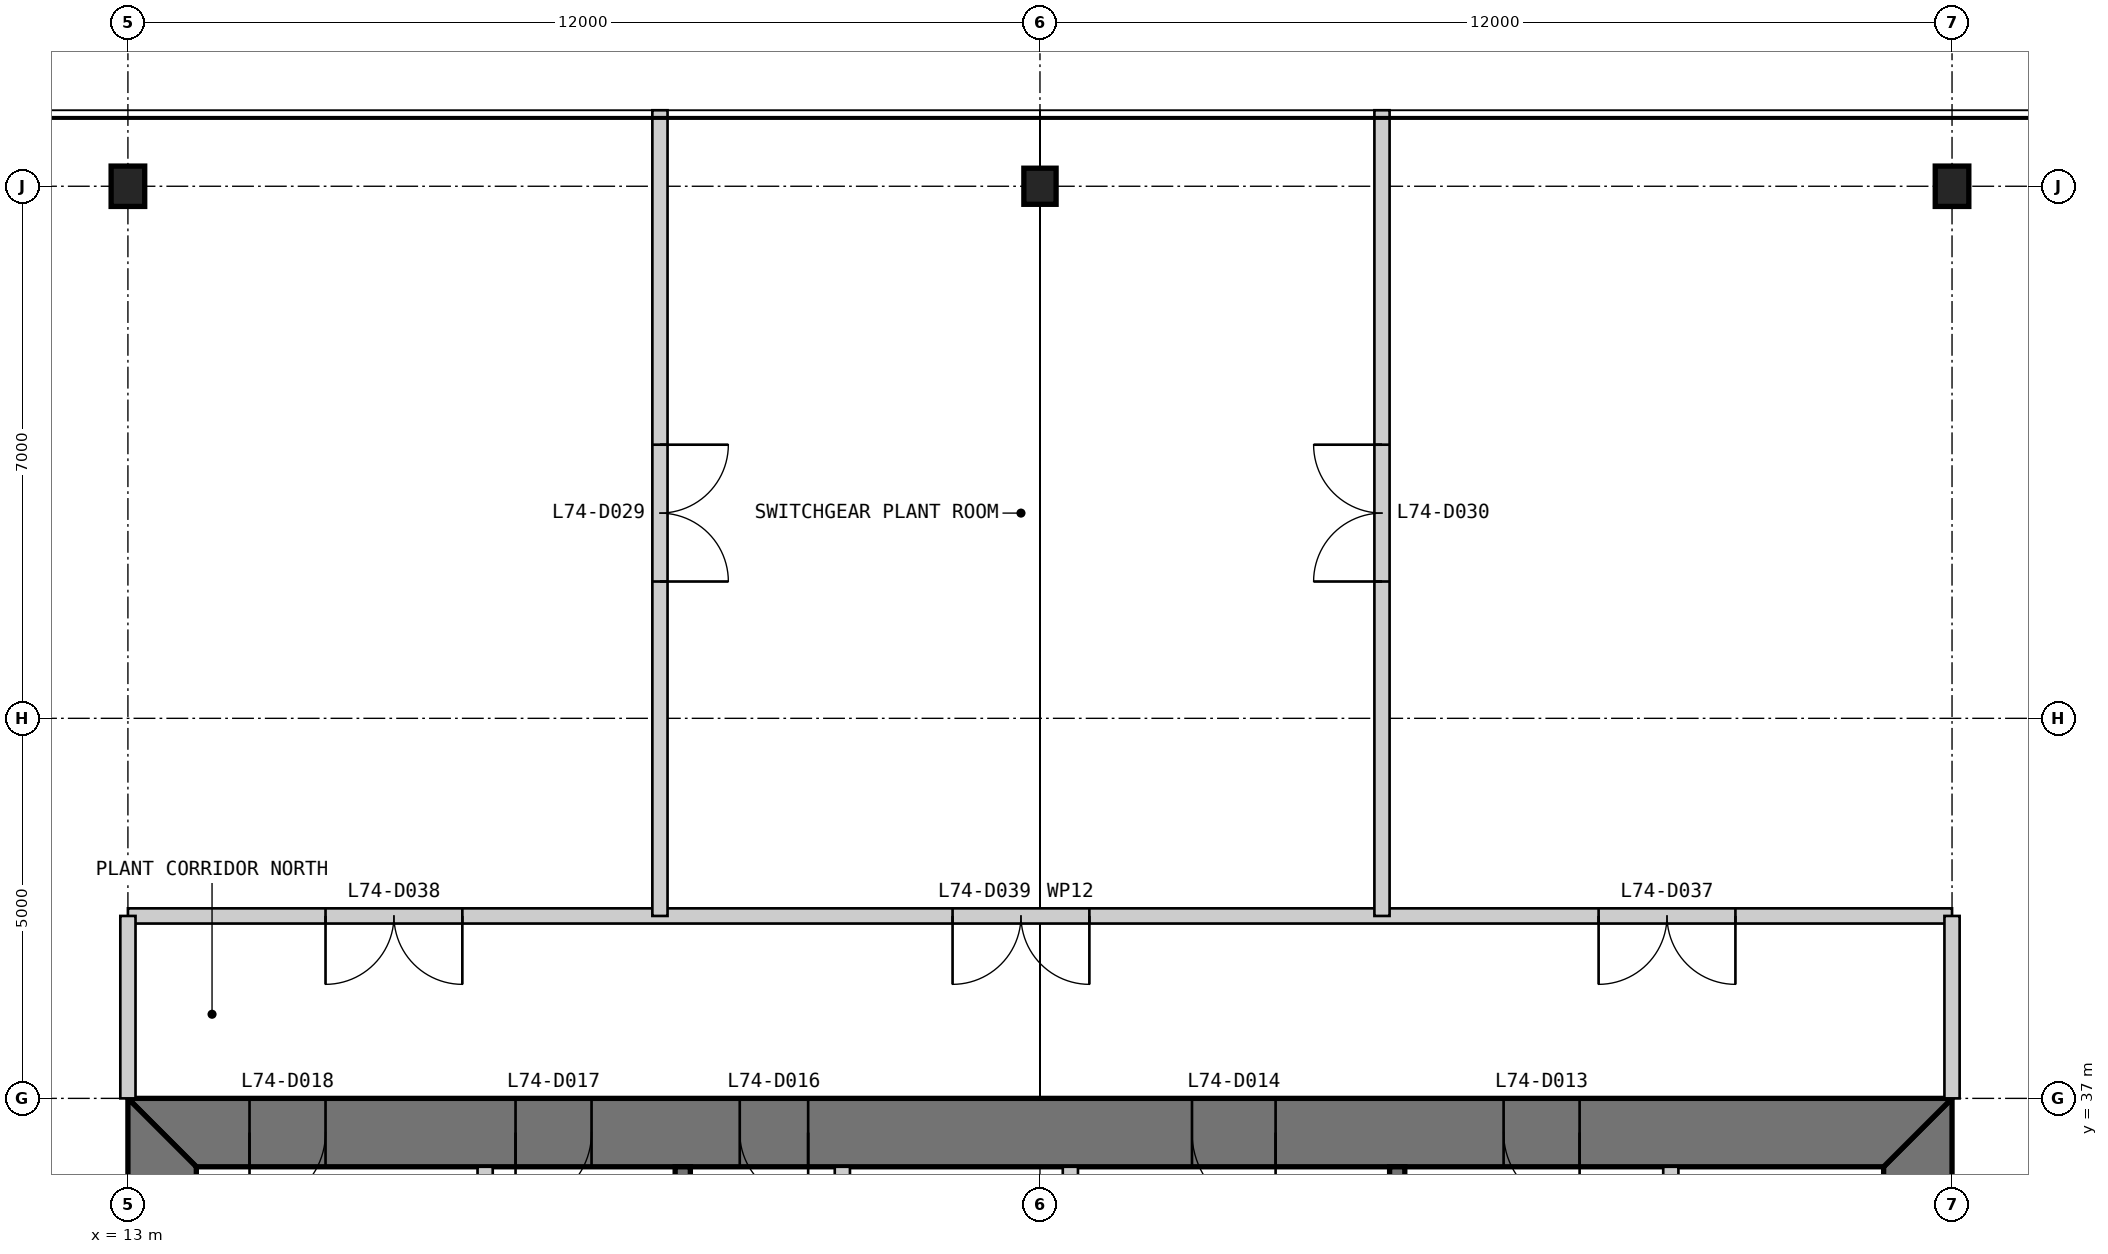
"""IFC4 building model, lengths in metres.
Left out: names, types, materials, properties, quantities, classifications, styles, units other than length and angle.
Written with IfcOpenShell. Run it as: python <this file> out.ifc"""

import sys

from ifc_helpers import new_model, si_unit, direction, frame, frame_2d, origin, origin_2d, place, context, subcontext, project, spatial, polyline, rectangle, i_section, outline, extrude, element, fill, save


model = new_model("IFC4")
c1 = context("Model", 3, precision=1e-05, world=origin(), true_north=direction((0.0, 1.0)))
c2 = subcontext(c1, "Body", "Model", "MODEL_VIEW")
j1 = project(units=[si_unit("LENGTHUNIT", "METRE"), si_unit("PLANEANGLEUNIT", "RADIAN")], contexts=[c1])
p1 = place(None, origin())
s1 = spatial("IfcSite", under=j1, at=p1, CompositionType="ELEMENT")
p2 = place(p1, origin())
s2 = spatial("IfcBuilding", under=s1, at=p2, CompositionType="ELEMENT")
p3 = place(p2, frame((0.0, 0.0, 307.8)))
s3 = spatial("IfcBuildingStorey", under=s2, at=p3, CompositionType="ELEMENT", Elevation=307.8)
p4 = place(p3, frame((37.0, 49.0, 0.0), z_axis=(0.0, 0.0, 1.0), x_axis=(1.0, 0.0, 0.0)))
e1 = element("IfcColumn", 1, at=p4, inside=s3, PredefinedType="COLUMN", context=c2, shape_type="SweptSolid", body=[
    extrude(i_section(OverallWidth=0.442, OverallDepth=0.531, WebThickness=0.066, FlangeThickness=0.106, at=origin_2d()), origin(), (0.0, 0.0, 1.0), 5.75),
])
p5 = place(p3, frame((25.0, 49.0, 0.0), z_axis=(0.0, 0.0, 1.0), x_axis=(1.0, 0.0, 0.0)))
e2 = element("IfcColumn", 2, at=p5, inside=s3, PredefinedType="COLUMN", context=c2, shape_type="SweptSolid", body=[
    extrude(i_section(OverallWidth=0.424, OverallDepth=0.475, WebThickness=0.048, FlangeThickness=0.077, at=origin_2d()), origin(), (0.0, 0.0, 1.0), 5.75),
])
p6 = place(p3, frame((13.0, 49.0, 0.0), z_axis=(0.0, 0.0, 1.0), x_axis=(1.0, 0.0, 0.0)))
e3 = element("IfcColumn", 3, at=p6, inside=s3, PredefinedType="COLUMN", context=c2, shape_type="SweptSolid", body=[
    extrude(i_section(OverallWidth=0.442, OverallDepth=0.531, WebThickness=0.066, FlangeThickness=0.106, at=origin_2d()), origin(), (0.0, 0.0, 1.0), 5.75),
])
p7 = place(p3, frame((36.55, 13.9, 0.0), z_axis=(0.0, 0.0, 1.0), x_axis=(0.0, 1.0, 0.0)))
e4 = element("IfcWall", 4, at=p7, inside=s3, PredefinedType="SHEAR", context=c2, shape_type="SweptSolid", body=[
    extrude(outline(polyline([(-0.9, -0.45), (23.1, -0.45), (22.2, 0.45), (0.0, 0.45), (-0.9, -0.45)])), origin(), (0.0, 0.0, 1.0), 5.75),
])
p8 = place(p7, frame((20.2, 0.0, 0.0)))
e5 = element("IfcOpeningElement", 5, at=p8, cuts=e4, PredefinedType="OPENING", context=c2, shape_type="SweptSolid", body=[
    extrude(rectangle(XDim=1.0, YDim=2.2, at=frame_2d((0.5, 1.1))), frame((0.0, 0.46, 0.0), z_axis=(0.0, -1.0, 0.0), x_axis=(1.0, 0.0, 0.0)), (0.0, 0.0, 1.0), 0.92),
])
p9 = place(p7, frame((17.25, 0.0, 0.0)))
e6 = element("IfcOpeningElement", 6, at=p9, cuts=e4, PredefinedType="OPENING", context=c2, shape_type="SweptSolid", body=[
    extrude(rectangle(XDim=0.9, YDim=2.2, at=frame_2d((0.45, 1.1))), frame((0.0, 0.46, 0.0), z_axis=(0.0, -1.0, 0.0), x_axis=(1.0, 0.0, 0.0)), (0.0, 0.0, 1.0), 0.92),
])
p10 = place(p3, frame((37.0, 36.55, 0.0), z_axis=(0.0, 0.0, 1.0), x_axis=(-1.0, 0.0, 0.0)))
e7 = element("IfcWall", 7, at=p10, inside=s3, PredefinedType="SHEAR", context=c2, shape_type="SweptSolid", body=[
    extrude(outline(polyline([(0.0, -0.45), (24.0, -0.45), (23.1, 0.45), (0.9, 0.45), (0.0, -0.45)])), origin(), (0.0, 0.0, 1.0), 5.75),
])
p11 = place(p10, frame((4.9, 0.0, 0.0)))
e8 = element("IfcOpeningElement", 8, at=p11, cuts=e7, PredefinedType="OPENING", context=c2, shape_type="SweptSolid", body=[
    extrude(rectangle(XDim=1.0, YDim=2.2, at=frame_2d((0.5, 1.1))), frame((0.0, 0.46, 0.0), z_axis=(0.0, -1.0, 0.0), x_axis=(1.0, 0.0, 0.0)), (0.0, 0.0, 1.0), 0.92),
])
p12 = place(p10, frame((8.9, 0.0, 0.0)))
e9 = element("IfcOpeningElement", 9, at=p12, cuts=e7, PredefinedType="OPENING", context=c2, shape_type="SweptSolid", body=[
    extrude(rectangle(XDim=1.1, YDim=2.2, at=frame_2d((0.55, 1.1))), frame((0.0, 0.46, 0.0), z_axis=(0.0, -1.0, 0.0), x_axis=(1.0, 0.0, 0.0)), (0.0, 0.0, 1.0), 0.92),
])
p13 = place(p10, frame((15.05, 0.0, 0.0)))
e10 = element("IfcOpeningElement", 10, at=p13, cuts=e7, PredefinedType="OPENING", context=c2, shape_type="SweptSolid", body=[
    extrude(rectangle(XDim=0.9, YDim=2.2, at=frame_2d((0.45, 1.1))), frame((0.0, 0.46, 0.0), z_axis=(0.0, -1.0, 0.0), x_axis=(1.0, 0.0, 0.0)), (0.0, 0.0, 1.0), 0.92),
])
p14 = place(p10, frame((17.9, 0.0, 0.0)))
e11 = element("IfcOpeningElement", 11, at=p14, cuts=e7, PredefinedType="OPENING", context=c2, shape_type="SweptSolid", body=[
    extrude(rectangle(XDim=1.0, YDim=2.2, at=frame_2d((0.5, 1.1))), frame((0.0, 0.46, 0.0), z_axis=(0.0, -1.0, 0.0), x_axis=(1.0, 0.0, 0.0)), (0.0, 0.0, 1.0), 0.92),
])
p15 = place(p10, frame((21.4, 0.0, 0.0)))
e12 = element("IfcOpeningElement", 12, at=p15, cuts=e7, PredefinedType="OPENING", context=c2, shape_type="SweptSolid", body=[
    extrude(rectangle(XDim=1.0, YDim=2.2, at=frame_2d((0.5, 1.1))), frame((0.0, 0.46, 0.0), z_axis=(0.0, -1.0, 0.0), x_axis=(1.0, 0.0, 0.0)), (0.0, 0.0, 1.0), 0.92),
])
p16 = place(p3, frame((13.45, 36.1, 0.0), z_axis=(0.0, 0.0, 1.0), x_axis=(0.0, -1.0, 0.0)))
e13 = element("IfcWall", 13, at=p16, inside=s3, PredefinedType="SHEAR", context=c2, shape_type="SweptSolid", body=[
    extrude(outline(polyline([(-0.9, -0.45), (23.1, -0.45), (22.2, 0.45), (0.0, 0.45), (-0.9, -0.45)])), origin(), (0.0, 0.0, 1.0), 5.75),
])
p17 = place(p16, frame((20.2, 0.0, 0.0)))
e14 = element("IfcOpeningElement", 14, at=p17, cuts=e13, PredefinedType="OPENING", context=c2, shape_type="SweptSolid", body=[
    extrude(rectangle(XDim=1.0, YDim=2.2, at=frame_2d((0.5, 1.1))), frame((0.0, 0.46, 0.0), z_axis=(0.0, -1.0, 0.0), x_axis=(1.0, 0.0, 0.0)), (0.0, 0.0, 1.0), 0.92),
])
p18 = place(p16, frame((17.25, 0.0, 0.0)))
e15 = element("IfcOpeningElement", 15, at=p18, cuts=e13, PredefinedType="OPENING", context=c2, shape_type="SweptSolid", body=[
    extrude(rectangle(XDim=0.9, YDim=2.2, at=frame_2d((0.45, 1.1))), frame((0.0, 0.46, 0.0), z_axis=(0.0, -1.0, 0.0), x_axis=(1.0, 0.0, 0.0)), (0.0, 0.0, 1.0), 0.92),
])
p19 = place(p3, frame((33.3, 36.1, 0.0), z_axis=(0.0, 0.0, 1.0), x_axis=(0.0, -1.0, 0.0)))
e16 = element("IfcWall", 16, at=p19, inside=s3, PredefinedType="PARTITIONING", context=c2, shape_type="SweptSolid", body=[
    extrude(rectangle(XDim=16.1, YDim=0.2, at=frame_2d((8.05, 0.0))), origin(), (0.0, 0.0, 1.0), 5.75),
])
p20 = place(p19, frame((9.65, 0.0, 0.0)))
e17 = element("IfcOpeningElement", 17, at=p20, cuts=e16, PredefinedType="OPENING", context=c2, shape_type="SweptSolid", body=[
    extrude(rectangle(XDim=0.9, YDim=2.2, at=frame_2d((0.45, 1.1))), frame((0.0, 0.11, 0.0), z_axis=(0.0, -1.0, 0.0), x_axis=(1.0, 0.0, 0.0)), (0.0, 0.0, 1.0), 0.22),
])
p21 = place(p19, frame((13.65, 0.0, 0.0)))
e18 = element("IfcOpeningElement", 18, at=p21, cuts=e16, PredefinedType="OPENING", context=c2, shape_type="SweptSolid", body=[
    extrude(rectangle(XDim=0.9, YDim=2.2, at=frame_2d((0.45, 1.1))), frame((0.0, 0.11, 0.0), z_axis=(0.0, -1.0, 0.0), x_axis=(1.0, 0.0, 0.0)), (0.0, 0.0, 1.0), 0.22),
])
p22 = place(p3, frame((29.7, 36.1, 0.0), z_axis=(0.0, 0.0, 1.0), x_axis=(0.0, -1.0, 0.0)))
e19 = element("IfcWall", 19, at=p22, inside=s3, PredefinedType="SOLIDWALL", context=c2, shape_type="SweptSolid", body=[
    extrude(rectangle(XDim=16.1, YDim=0.2, at=frame_2d((8.05, 0.0))), origin(), (0.0, 0.0, 1.0), 5.75),
])
p23 = place(p22, frame((10.65, 0.0, 0.0)))
e20 = element("IfcOpeningElement", 20, at=p23, cuts=e19, PredefinedType="OPENING", context=c2, shape_type="SweptSolid", body=[
    extrude(rectangle(XDim=0.9, YDim=2.2, at=frame_2d((0.45, 1.1))), frame((0.0, 0.11, 0.0), z_axis=(0.0, -1.0, 0.0), x_axis=(1.0, 0.0, 0.0)), (0.0, 0.0, 1.0), 0.22),
])
p24 = place(p3, frame((25.4, 36.1, 0.0), z_axis=(0.0, 0.0, 1.0), x_axis=(0.0, -1.0, 0.0)))
e21 = element("IfcWall", 21, at=p24, inside=s3, PredefinedType="PARTITIONING", context=c2, shape_type="SweptSolid", body=[
    extrude(rectangle(XDim=3.3, YDim=0.2, at=frame_2d((1.65, 0.0))), origin(), (0.0, 0.0, 1.0), 5.75),
])
p25 = place(p24, frame((0.9, 0.0, 0.0)))
e22 = element("IfcOpeningElement", 22, at=p25, cuts=e21, PredefinedType="OPENING", context=c2, shape_type="SweptSolid", body=[
    extrude(rectangle(XDim=1.1, YDim=2.2, at=frame_2d((0.55, 1.1))), frame((0.0, 0.11, 0.0), z_axis=(0.0, -1.0, 0.0), x_axis=(1.0, 0.0, 0.0)), (0.0, 0.0, 1.0), 0.22),
])
p26 = place(p3, frame((22.4, 36.1, 0.0), z_axis=(0.0, 0.0, 1.0), x_axis=(0.0, -1.0, 0.0)))
e23 = element("IfcWall", 23, at=p26, inside=s3, PredefinedType="PARTITIONING", context=c2, shape_type="SweptSolid", body=[
    extrude(rectangle(XDim=3.3, YDim=0.2, at=frame_2d((1.65, 0.0))), origin(), (0.0, 0.0, 1.0), 5.75),
])
p27 = place(p3, frame((20.3, 36.1, 0.0), z_axis=(0.0, 0.0, 1.0), x_axis=(0.0, -1.0, 0.0)))
e24 = element("IfcWall", 24, at=p27, inside=s3, PredefinedType="SOLIDWALL", context=c2, shape_type="SweptSolid", body=[
    extrude(rectangle(XDim=6.1, YDim=0.2, at=frame_2d((3.05, 0.0))), origin(), (0.0, 0.0, 1.0), 5.75),
])
p28 = place(p3, frame((17.7, 36.1, 0.0), z_axis=(0.0, 0.0, 1.0), x_axis=(0.0, -1.0, 0.0)))
e25 = element("IfcWall", 25, at=p28, inside=s3, PredefinedType="PARTITIONING", context=c2, shape_type="SweptSolid", body=[
    extrude(rectangle(XDim=6.1, YDim=0.2, at=frame_2d((3.05, 0.0))), origin(), (0.0, 0.0, 1.0), 5.75),
])
p29 = place(p3, frame((13.0, 39.4, 0.0), z_axis=(0.0, 0.0, 1.0), x_axis=(1.0, 0.0, 0.0)))
e26 = element("IfcWall", 26, at=p29, inside=s3, PredefinedType="PARTITIONING", context=c2, shape_type="SweptSolid", body=[
    extrude(rectangle(XDim=24.0, YDim=0.2, at=frame_2d((12.0, 0.0))), origin(), (0.0, 0.0, 1.0), 5.75),
])
p30 = place(p29, frame((19.35, 0.0, 0.0)))
e27 = element("IfcOpeningElement", 27, at=p30, cuts=e26, PredefinedType="OPENING", context=c2, shape_type="SweptSolid", body=[
    extrude(rectangle(XDim=1.8, YDim=2.4, at=frame_2d((0.9, 1.2))), frame((0.0, 0.11, 0.0), z_axis=(0.0, -1.0, 0.0), x_axis=(1.0, 0.0, 0.0)), (0.0, 0.0, 1.0), 0.22),
])
p31 = place(p29, frame((2.6, 0.0, 0.0)))
e28 = element("IfcOpeningElement", 28, at=p31, cuts=e26, PredefinedType="OPENING", context=c2, shape_type="SweptSolid", body=[
    extrude(rectangle(XDim=1.8, YDim=2.4, at=frame_2d((0.9, 1.2))), frame((0.0, 0.11, 0.0), z_axis=(0.0, -1.0, 0.0), x_axis=(1.0, 0.0, 0.0)), (0.0, 0.0, 1.0), 0.22),
])
p32 = place(p29, frame((10.85, 0.0, 0.0)))
e29 = element("IfcOpeningElement", 29, at=p32, cuts=e26, PredefinedType="OPENING", context=c2, shape_type="SweptSolid", body=[
    extrude(rectangle(XDim=1.8, YDim=2.4, at=frame_2d((0.9, 1.2))), frame((0.0, 0.11, 0.0), z_axis=(0.0, -1.0, 0.0), x_axis=(1.0, 0.0, 0.0)), (0.0, 0.0, 1.0), 0.22),
])
for number, where, z_axis, x_axis in (
    (30, (13.0, 37.0, 0.0), (0.0, 0.0, 1.0), (0.0, 1.0, 0.0)),
    (31, (37.0, 37.0, 0.0), (0.0, 0.0, 1.0), (0.0, 1.0, 0.0)),
):
    element("IfcWall", number, at=place(p3, frame(where, z_axis=z_axis, x_axis=x_axis)), inside=s3, PredefinedType="PARTITIONING", context=c2, shape_type="SweptSolid", body=[
        extrude(rectangle(XDim=2.4, YDim=0.2, at=frame_2d((1.2, 0.0))), origin(), (0.0, 0.0, 1.0), 4.802),
    ])
p33 = place(p3, frame((20.0, 39.4, 0.0), z_axis=(0.0, 0.0, 1.0), x_axis=(0.0, 1.0, 0.0)))
e32 = element("IfcWall", 32, at=p33, inside=s3, PredefinedType="PARTITIONING", context=c2, shape_type="SweptSolid", body=[
    extrude(rectangle(XDim=10.6, YDim=0.2, at=frame_2d((5.3, 0.0))), origin(), (0.0, 0.0, 1.0), 5.75),
])
p34 = place(p33, frame((4.4, 0.0, 0.0)))
e33 = element("IfcOpeningElement", 33, at=p34, cuts=e32, PredefinedType="OPENING", context=c2, shape_type="SweptSolid", body=[
    extrude(rectangle(XDim=1.8, YDim=2.4, at=frame_2d((0.9, 1.2))), frame((0.0, 0.11, 0.0), z_axis=(0.0, -1.0, 0.0), x_axis=(1.0, 0.0, 0.0)), (0.0, 0.0, 1.0), 0.22),
])
p35 = place(p3, frame((29.5, 39.4, 0.0), z_axis=(0.0, 0.0, 1.0), x_axis=(0.0, 1.0, 0.0)))
e34 = element("IfcWall", 34, at=p35, inside=s3, PredefinedType="PARTITIONING", context=c2, shape_type="SweptSolid", body=[
    extrude(rectangle(XDim=10.6, YDim=0.2, at=frame_2d((5.3, 0.0))), origin(), (0.0, 0.0, 1.0), 5.75),
])
p36 = place(p35, frame((4.4, 0.0, 0.0)))
e35 = element("IfcOpeningElement", 35, at=p36, cuts=e34, PredefinedType="OPENING", context=c2, shape_type="SweptSolid", body=[
    extrude(rectangle(XDim=1.8, YDim=2.4, at=frame_2d((0.9, 1.2))), frame((0.0, 0.11, 0.0), z_axis=(0.0, -1.0, 0.0), x_axis=(1.0, 0.0, 0.0)), (0.0, 0.0, 1.0), 0.22),
])
p37 = place(p11, origin())
e36 = element("IfcDoor", 36, at=p37, inside=s3, OperationType="SINGLE_SWING_LEFT", PredefinedType="DOOR", context=c2, shape_type="SweptSolid", body=[
    extrude(rectangle(XDim=1.0, YDim=2.2, at=frame_2d((0.5, 1.1))), frame((0.0, 0.025, 0.0), z_axis=(0.0, -1.0, 0.0), x_axis=(1.0, 0.0, 0.0)), (0.0, 0.0, 1.0), 0.05),
    extrude(outline(polyline([(0.0, 0.0), (0.04, 0.0), (0.04, 2.16), (0.96, 2.16), (0.96, 0.0), (1.0, 0.0), (1.0, 2.2), (0.0, 2.2), (0.0, 0.0)])), frame((0.0, 0.3, 0.0), z_axis=(0.0, -1.0, 0.0), x_axis=(1.0, 0.0, 0.0)), (0.0, 0.0, 1.0), 0.6),
])
fill(e8, e36)
p38 = place(p12, origin())
e37 = element("IfcDoor", 37, at=p38, inside=s3, OperationType="SINGLE_SWING_LEFT", PredefinedType="DOOR", context=c2, shape_type="SweptSolid", body=[
    extrude(rectangle(XDim=1.1, YDim=2.2, at=frame_2d((0.55, 1.1))), frame((0.0, 0.025, 0.0), z_axis=(0.0, -1.0, 0.0), x_axis=(1.0, 0.0, 0.0)), (0.0, 0.0, 1.0), 0.05),
    extrude(outline(polyline([(0.0, 0.0), (0.04, 0.0), (0.04, 2.16), (1.06, 2.16), (1.06, 0.0), (1.1, 0.0), (1.1, 2.2), (0.0, 2.2), (0.0, 0.0)])), frame((0.0, 0.3, 0.0), z_axis=(0.0, -1.0, 0.0), x_axis=(1.0, 0.0, 0.0)), (0.0, 0.0, 1.0), 0.6),
])
fill(e9, e37)
p39 = place(p13, origin())
e38 = element("IfcDoor", 38, at=p39, inside=s3, OperationType="SINGLE_SWING_LEFT", PredefinedType="DOOR", context=c2, shape_type="SweptSolid", body=[
    extrude(rectangle(XDim=0.9, YDim=2.2, at=frame_2d((0.45, 1.1))), frame((0.0, 0.025, 0.0), z_axis=(0.0, -1.0, 0.0), x_axis=(1.0, 0.0, 0.0)), (0.0, 0.0, 1.0), 0.05),
    extrude(outline(polyline([(0.0, 0.0), (0.04, 0.0), (0.04, 2.16), (0.86, 2.16), (0.86, 0.0), (0.9, 0.0), (0.9, 2.2), (0.0, 2.2), (0.0, 0.0)])), frame((0.0, 0.3, 0.0), z_axis=(0.0, -1.0, 0.0), x_axis=(1.0, 0.0, 0.0)), (0.0, 0.0, 1.0), 0.6),
])
fill(e10, e38)
p40 = place(p14, origin())
e39 = element("IfcDoor", 39, at=p40, inside=s3, OperationType="SINGLE_SWING_RIGHT", PredefinedType="DOOR", context=c2, shape_type="SweptSolid", body=[
    extrude(rectangle(XDim=1.0, YDim=2.2, at=frame_2d((0.5, 1.1))), frame((0.0, 0.025, 0.0), z_axis=(0.0, -1.0, 0.0), x_axis=(1.0, 0.0, 0.0)), (0.0, 0.0, 1.0), 0.05),
    extrude(outline(polyline([(0.0, 0.0), (0.04, 0.0), (0.04, 2.16), (0.96, 2.16), (0.96, 0.0), (1.0, 0.0), (1.0, 2.2), (0.0, 2.2), (0.0, 0.0)])), frame((0.0, 0.3, 0.0), z_axis=(0.0, -1.0, 0.0), x_axis=(1.0, 0.0, 0.0)), (0.0, 0.0, 1.0), 0.6),
])
fill(e11, e39)
p41 = place(p15, origin())
e40 = element("IfcDoor", 40, at=p41, inside=s3, OperationType="SINGLE_SWING_RIGHT", PredefinedType="DOOR", context=c2, shape_type="SweptSolid", body=[
    extrude(rectangle(XDim=1.0, YDim=2.2, at=frame_2d((0.5, 1.1))), frame((0.0, 0.025, 0.0), z_axis=(0.0, -1.0, 0.0), x_axis=(1.0, 0.0, 0.0)), (0.0, 0.0, 1.0), 0.05),
    extrude(outline(polyline([(0.0, 0.0), (0.04, 0.0), (0.04, 2.16), (0.96, 2.16), (0.96, 0.0), (1.0, 0.0), (1.0, 2.2), (0.0, 2.2), (0.0, 0.0)])), frame((0.0, 0.3, 0.0), z_axis=(0.0, -1.0, 0.0), x_axis=(1.0, 0.0, 0.0)), (0.0, 0.0, 1.0), 0.6),
])
fill(e12, e40)
p42 = place(p34, frame((1.8, 0.0, 0.0), z_axis=(0.0, 0.0, 1.0), x_axis=(-1.0, 0.0, 0.0)))
e41 = element("IfcDoor", 41, at=p42, inside=s3, OperationType="DOUBLE_DOOR_SINGLE_SWING", PredefinedType="DOOR", context=c2, shape_type="SweptSolid", body=[
    extrude(rectangle(XDim=1.8, YDim=2.4, at=frame_2d((0.9, 1.2))), frame((0.0, 0.025, 0.0), z_axis=(0.0, -1.0, 0.0), x_axis=(1.0, 0.0, 0.0)), (0.0, 0.0, 1.0), 0.05),
])
fill(e33, e41)
p43 = place(p36, origin())
e42 = element("IfcDoor", 42, at=p43, inside=s3, OperationType="DOUBLE_DOOR_SINGLE_SWING", PredefinedType="DOOR", context=c2, shape_type="SweptSolid", body=[
    extrude(rectangle(XDim=1.8, YDim=2.4, at=frame_2d((0.9, 1.2))), frame((0.0, 0.025, 0.0), z_axis=(0.0, -1.0, 0.0), x_axis=(1.0, 0.0, 0.0)), (0.0, 0.0, 1.0), 0.05),
])
fill(e35, e42)
p44 = place(p30, frame((1.8, 0.0, 0.0), z_axis=(0.0, 0.0, 1.0), x_axis=(-1.0, 0.0, 0.0)))
e43 = element("IfcDoor", 43, at=p44, inside=s3, OperationType="DOUBLE_DOOR_SINGLE_SWING", PredefinedType="DOOR", context=c2, shape_type="SweptSolid", body=[
    extrude(rectangle(XDim=1.8, YDim=2.4, at=frame_2d((0.9, 1.2))), frame((0.0, 0.025, 0.0), z_axis=(0.0, -1.0, 0.0), x_axis=(1.0, 0.0, 0.0)), (0.0, 0.0, 1.0), 0.05),
])
fill(e27, e43)
p45 = place(p31, frame((1.8, 0.0, 0.0), z_axis=(0.0, 0.0, 1.0), x_axis=(-1.0, 0.0, 0.0)))
e44 = element("IfcDoor", 44, at=p45, inside=s3, OperationType="DOUBLE_DOOR_SINGLE_SWING", PredefinedType="DOOR", context=c2, shape_type="SweptSolid", body=[
    extrude(rectangle(XDim=1.8, YDim=2.4, at=frame_2d((0.9, 1.2))), frame((0.0, 0.025, 0.0), z_axis=(0.0, -1.0, 0.0), x_axis=(1.0, 0.0, 0.0)), (0.0, 0.0, 1.0), 0.05),
])
fill(e28, e44)
p46 = place(p32, frame((1.8, 0.0, 0.0), z_axis=(0.0, 0.0, 1.0), x_axis=(-1.0, 0.0, 0.0)))
e45 = element("IfcDoor", 45, at=p46, inside=s3, OperationType="DOUBLE_DOOR_SINGLE_SWING", PredefinedType="DOOR", context=c2, shape_type="SweptSolid", body=[
    extrude(rectangle(XDim=1.8, YDim=2.4, at=frame_2d((0.9, 1.2))), frame((0.0, 0.025, 0.0), z_axis=(0.0, -1.0, 0.0), x_axis=(1.0, 0.0, 0.0)), (0.0, 0.0, 1.0), 0.05),
])
fill(e29, e45)
save(model, sys.argv[1])
